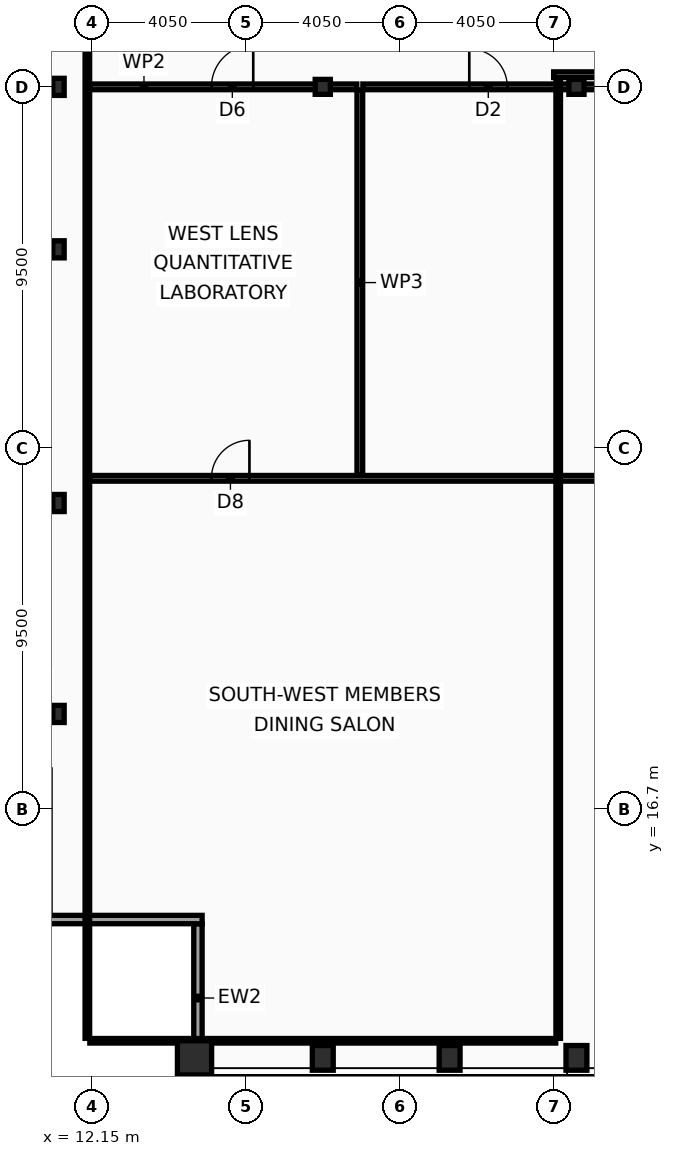
"""IFC4 building model, lengths in metres.
Left out: names, types, materials, properties, quantities, classifications, styles, units other than length and angle.
Written with IfcOpenShell. Run it as: python <this file> out.ifc"""

import sys

from ifc_helpers import new_model, si_unit, direction, frame, frame_2d, origin, origin_2d, place, context, subcontext, project, spatial, rectangle, hollow_rectangle, i_section, extrude, element, fill, save


model = new_model("IFC4")
c1 = context("Model", 3, precision=1e-05, world=origin(), true_north=direction((0.0, 1.0)))
c2 = subcontext(c1, "Body", "Model", "MODEL_VIEW")
j1 = project(units=[si_unit("LENGTHUNIT", "METRE"), si_unit("PLANEANGLEUNIT", "RADIAN")], contexts=[c1])
p1 = place(None, origin())
s1 = spatial("IfcSite", under=j1, at=p1, CompositionType="ELEMENT")
p2 = place(p1, origin())
s2 = spatial("IfcBuilding", under=s1, at=p2, CompositionType="ELEMENT")
p3 = place(p2, frame((0.0, 0.0, 310.2)))
s3 = spatial("IfcBuildingStorey", under=s2, at=p3, CompositionType="ELEMENT", Elevation=310.2)
p4 = place(p3, frame((14.85, 10.15, 0.0), z_axis=(0.0, 0.0, 1.0), x_axis=(1.0, 0.0, 0.0)))
e1 = element("IfcColumn", 1, at=p4, inside=s3, PredefinedType="COLUMN", context=c2, shape_type="SweptSolid", body=[
    extrude(hollow_rectangle(XDim=0.9, YDim=0.9, WallThickness=0.05, at=origin_2d()), origin(), (0.0, 0.0, 1.0), 4.4),
])
for number, where, z_axis, x_axis in (
    (2, (18.225, 10.15, 0.0), (0.0, 0.0, 1.0), (1.0, 0.0, 0.0)),
    (3, (21.562, 10.15, 0.0), (0.0, 0.0, 1.0), (1.0, 0.0, 0.0)),
    (4, (24.9, 10.15, 0.0), (0.0, 0.0, 1.0), (1.0, 0.0, 0.0)),
):
    element("IfcColumn", number, at=place(p3, frame(where, z_axis=z_axis, x_axis=x_axis)), inside=s3, PredefinedType="COLUMN", context=c2, shape_type="SweptSolid", body=[
        extrude(hollow_rectangle(XDim=0.55, YDim=0.65, WallThickness=0.04, at=origin_2d()), origin(), (0.0, 0.0, 1.0), 4.4),
    ])
for number, where, z_axis, x_axis in (
    (5, (11.27, 19.2, 0.0), (0.0, 0.0, 1.0), (1.0, 0.0, 0.0)),
    (6, (11.27, 24.75, 0.0), (0.0, 0.0, 1.0), (1.0, 0.0, 0.0)),
    (7, (11.27, 31.425, 0.0), (0.0, 0.0, 1.0), (1.0, 0.0, 0.0)),
    (8, (11.27, 35.7, 0.0), (0.0, 0.0, 1.0), (1.0, 0.0, 0.0)),
):
    element("IfcColumn", number, at=place(p3, frame(where, z_axis=z_axis, x_axis=x_axis)), inside=s3, PredefinedType="COLUMN", context=c2, shape_type="SweptSolid", body=[
        extrude(i_section(OverallWidth=0.3, OverallDepth=0.45, WebThickness=0.014, FlangeThickness=0.026, at=origin_2d()), origin(), (0.0, 0.0, 1.0), 4.4),
    ])
for number, where, z_axis, x_axis in (
    (9, (18.225, 35.7, 0.0), (0.0, 0.0, 1.0), (1.0, 0.0, 0.0)),
    (10, (24.9, 35.7, 0.0), (0.0, 0.0, 1.0), (1.0, 0.0, 0.0)),
):
    element("IfcColumn", number, at=place(p3, frame(where, z_axis=z_axis, x_axis=x_axis)), inside=s3, PredefinedType="COLUMN", context=c2, shape_type="SweptSolid", body=[
        extrude(i_section(OverallWidth=0.399, OverallDepth=0.393, WebThickness=0.023, FlangeThickness=0.037, at=origin_2d()), origin(), (0.0, 0.0, 1.0), 4.4),
    ])
p5 = place(p3, frame((14.94, 9.77, 0.0), z_axis=(0.0, 0.0, 1.0), x_axis=(0.0, 1.0, 0.0)))
e11 = element("IfcWall", 11, at=p5, inside=s3, PredefinedType="SOLIDWALL", context=c2, shape_type="SweptSolid", body=[
    extrude(rectangle(XDim=3.91, YDim=0.22, at=frame_2d((1.955, 0.0))), origin(), (0.0, 0.0, 1.0), 3.68),
])
p6 = place(p3, frame((15.05, 13.79, 0.0), z_axis=(0.0, 0.0, 1.0), x_axis=(-1.0, 0.0, 0.0)))
e12 = element("IfcWall", 12, at=p6, inside=s3, PredefinedType="SOLIDWALL", context=c2, shape_type="SweptSolid", body=[
    extrude(rectangle(XDim=4.22, YDim=0.22, at=frame_2d((2.11, 0.0))), origin(), (0.0, 0.0, 1.0), 3.68),
])
p7 = place(p3, frame((12.095, 35.7, 0.0), z_axis=(0.0, 0.0, 1.0), x_axis=(1.0, 0.0, 0.0)))
e13 = element("IfcWall", 13, at=p7, inside=s3, PredefinedType="PARTITIONING", context=c2, shape_type="SweptSolid", body=[
    extrude(rectangle(XDim=7.025, YDim=0.15, at=frame_2d((3.513, 0.0))), origin(), (0.0, 0.0, 1.0), 3.63),
])
p8 = place(p7, frame((3.2, 0.0, 0.0)))
e14 = element("IfcOpeningElement", 14, at=p8, cuts=e13, PredefinedType="OPENING", context=c2, shape_type="SweptSolid", body=[
    extrude(rectangle(XDim=1.1, YDim=2.1, at=frame_2d((0.55, 1.05))), frame((0.0, 0.085, 0.0), z_axis=(0.0, -1.0, 0.0), x_axis=(1.0, 0.0, 0.0)), (0.0, 0.0, 1.0), 0.17),
])
p9 = place(p3, frame((19.28, 35.7, 0.0), z_axis=(0.0, 0.0, 1.0), x_axis=(1.0, 0.0, 0.0)))
e15 = element("IfcWall", 15, at=p9, inside=s3, PredefinedType="PARTITIONING", context=c2, shape_type="SweptSolid", body=[
    extrude(rectangle(XDim=6.92, YDim=0.15, at=frame_2d((3.46, 0.0))), origin(), (0.0, 0.0, 1.0), 3.63),
])
p10 = place(p9, frame((2.8, 0.0, 0.0)))
e16 = element("IfcOpeningElement", 16, at=p10, cuts=e15, PredefinedType="OPENING", context=c2, shape_type="SweptSolid", body=[
    extrude(rectangle(XDim=1.0, YDim=2.05, at=frame_2d((0.5, 1.025))), frame((0.0, 0.085, 0.0), z_axis=(0.0, -1.0, 0.0), x_axis=(1.0, 0.0, 0.0)), (0.0, 0.0, 1.0), 0.17),
])
p11 = place(p3, frame((19.2, 25.48, 0.0), z_axis=(0.0, 0.0, 1.0), x_axis=(0.0, 1.0, 0.0)))
e17 = element("IfcWall", 17, at=p11, inside=s3, PredefinedType="PARTITIONING", context=c2, shape_type="SweptSolid", body=[
    extrude(rectangle(XDim=10.14, YDim=0.15, at=frame_2d((5.07, 0.0))), origin(), (0.0, 0.0, 1.0), 3.87),
])
p12 = place(p3, frame((12.095, 25.4, 0.0), z_axis=(0.0, 0.0, 1.0), x_axis=(1.0, 0.0, 0.0)))
e18 = element("IfcWall", 18, at=p12, inside=s3, PredefinedType="PARTITIONING", context=c2, shape_type="SweptSolid", body=[
    extrude(rectangle(XDim=14.105, YDim=0.15, at=frame_2d((7.052, 0.0))), origin(), (0.0, 0.0, 1.0), 3.63),
])
p13 = place(p12, frame((3.2, 0.0, 0.0)))
e19 = element("IfcOpeningElement", 19, at=p13, cuts=e18, PredefinedType="OPENING", context=c2, shape_type="SweptSolid", body=[
    extrude(rectangle(XDim=1.0, YDim=2.05, at=frame_2d((0.5, 1.025))), frame((0.0, 0.085, 0.0), z_axis=(0.0, -1.0, 0.0), x_axis=(1.0, 0.0, 0.0)), (0.0, 0.0, 1.0), 0.17),
])
p14 = place(p3, frame((24.3, 36.02, 0.0), z_axis=(0.0, 0.0, 1.0), x_axis=(1.0, 0.0, 0.0)))
e20 = element("IfcWall", 20, at=p14, inside=s3, PredefinedType="PARTITIONING", context=c2, shape_type="SweptSolid", body=[
    extrude(rectangle(XDim=24.3, YDim=0.15, at=frame_2d((12.15, 0.0))), origin(), (0.0, 0.0, 1.0), 3.63),
])
p15 = place(p3, frame((12.03, 10.665, 0.0), z_axis=(0.0, 0.0, 1.0), x_axis=(0.0, 1.0, 0.0)))
e21 = element("IfcWall", 21, at=p15, inside=s3, PredefinedType="PARTITIONING", context=c2, shape_type="SweptSolid", body=[
    extrude(rectangle(XDim=42.11, YDim=0.12, at=frame_2d((21.055, 0.0))), origin(), (0.0, 0.0, 1.0), 3.63),
])
p16 = place(p3, frame((12.095, 10.6, 0.0), z_axis=(0.0, 0.0, 1.0), x_axis=(1.0, 0.0, 0.0)))
e22 = element("IfcWall", 22, at=p16, inside=s3, PredefinedType="PARTITIONING", context=c2, shape_type="SweptSolid", body=[
    extrude(rectangle(XDim=12.26, YDim=0.12, at=frame_2d((6.13, 0.0))), origin(), (0.0, 0.0, 1.0), 3.63),
])
p17 = place(p3, frame((24.42, 10.665, 0.0), z_axis=(0.0, 0.0, 1.0), x_axis=(0.0, 1.0, 0.0)))
e23 = element("IfcWall", 23, at=p17, inside=s3, PredefinedType="PARTITIONING", context=c2, shape_type="SweptSolid", body=[
    extrude(rectangle(XDim=25.275, YDim=0.12, at=frame_2d((12.637, 0.0))), origin(), (0.0, 0.0, 1.0), 3.63),
])
p18 = place(p8, origin())
e24 = element("IfcDoor", 24, at=p18, inside=s3, OperationType="SINGLE_SWING_RIGHT", PredefinedType="DOOR", context=c2, shape_type="SweptSolid", body=[
    extrude(rectangle(XDim=1.1, YDim=2.1, at=frame_2d((0.55, 1.05))), frame((0.0, 0.025, 0.0), z_axis=(0.0, -1.0, 0.0), x_axis=(1.0, 0.0, 0.0)), (0.0, 0.0, 1.0), 0.05),
])
fill(e14, e24)
p19 = place(p10, origin())
e25 = element("IfcDoor", 25, at=p19, inside=s3, OperationType="SINGLE_SWING_LEFT", PredefinedType="DOOR", context=c2, shape_type="SweptSolid", body=[
    extrude(rectangle(XDim=1.0, YDim=2.05, at=frame_2d((0.5, 1.025))), frame((0.0, 0.025, 0.0), z_axis=(0.0, -1.0, 0.0), x_axis=(1.0, 0.0, 0.0)), (0.0, 0.0, 1.0), 0.05),
])
fill(e16, e25)
p20 = place(p13, origin())
e26 = element("IfcDoor", 26, at=p20, inside=s3, OperationType="SINGLE_SWING_RIGHT", PredefinedType="DOOR", context=c2, shape_type="SweptSolid", body=[
    extrude(rectangle(XDim=1.0, YDim=2.05, at=frame_2d((0.5, 1.025))), frame((0.0, 0.025, 0.0), z_axis=(0.0, -1.0, 0.0), x_axis=(1.0, 0.0, 0.0)), (0.0, 0.0, 1.0), 0.05),
])
fill(e19, e26)
save(model, sys.argv[1])
